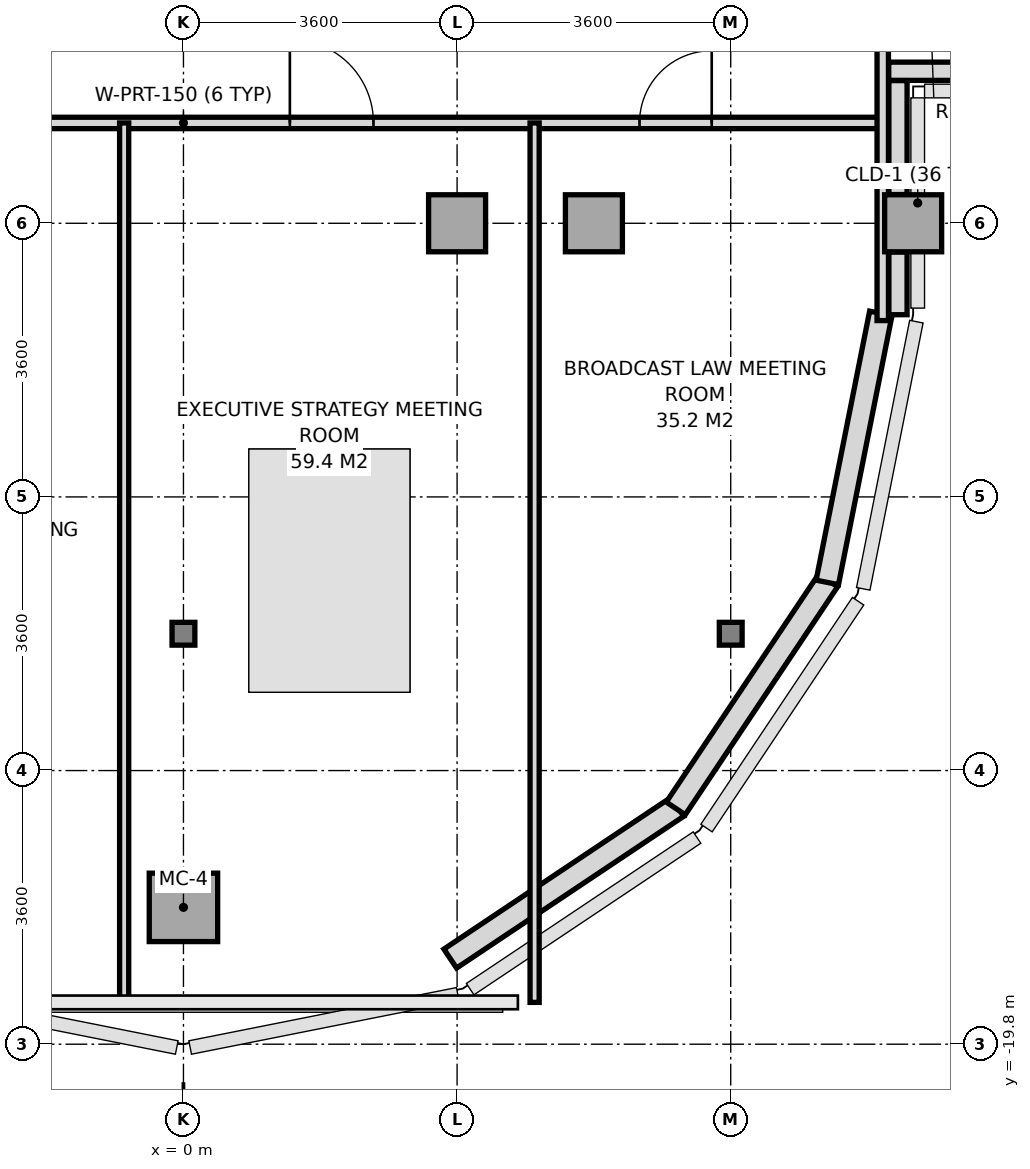
"""IFC4 building model, lengths in metres.
Left out: names, types, materials, properties, quantities, classifications, styles, units other than length and angle.
Written with IfcOpenShell. Run it as: python <this file> out.ifc"""

import sys

from ifc_helpers import new_model, si_unit, direction, frame, frame_2d, origin, origin_2d, place, context, subcontext, project, spatial, rectangle, i_section, extrude, source, transform, mapped, element, fill, save


model = new_model("IFC4")
c1 = context("Model", 3, precision=1e-05, world=origin(), true_north=direction((0.0, 1.0)))
c2 = subcontext(c1, "Body", "Model", "MODEL_VIEW")
j1 = project(units=[si_unit("LENGTHUNIT", "METRE"), si_unit("PLANEANGLEUNIT", "RADIAN")], contexts=[c1])
p1 = place(None, origin())
s1 = spatial("IfcSite", under=j1, at=p1, CompositionType="ELEMENT")
p2 = place(p1, origin())
s2 = spatial("IfcBuilding", under=s1, at=p2, CompositionType="ELEMENT")
p3 = place(p2, frame((0.0, 0.0, 262.0)))
s3 = spatial("IfcBuildingStorey", under=s2, at=p3, CompositionType="ELEMENT", Elevation=262.0)
m1 = source(origin(), c2, "Body", "SweptSolid", [
    extrude(rectangle(XDim=0.9, YDim=0.9, at=origin_2d()), origin(), (0.0, 0.0, 1.0), 3.01),
])
p4 = place(p3, frame((0.0, -18.0, 0.0), z_axis=(0.0, 0.0, 1.0), x_axis=(1.0, 0.0, 0.0)))
e1 = element("IfcColumn", 1, at=p4, inside=s3, PredefinedType="COLUMN", context=c2, shape_type="MappedRepresentation", body=[
    mapped(m1, transform((0.0, 0.0, 0.0), x_axis=(1.0, 0.0, 0.0), y_axis=(0.0, 1.0, 0.0), z_axis=(0.0, 0.0, 1.0), scale=1.0)),
])
m2 = source(origin(), c2, "Body", "SweptSolid", [
    extrude(i_section(OverallWidth=0.3, OverallDepth=0.3, WebThickness=0.011, FlangeThickness=0.019, at=origin_2d()), origin(), (0.0, 0.0, 1.0), 3.01),
])
p5 = place(p3, frame((0.0, -14.4, 0.0), z_axis=(0.0, 0.0, 1.0), x_axis=(1.0, 0.0, 0.0)))
e2 = element("IfcColumn", 2, at=p5, inside=s3, PredefinedType="COLUMN", context=c2, shape_type="MappedRepresentation", body=[
    mapped(m2, transform((0.0, 0.0, 0.0), x_axis=(1.0, 0.0, 0.0), y_axis=(0.0, 1.0, 0.0), z_axis=(0.0, 0.0, 1.0), scale=1.0)),
])
m3 = source(origin(), c2, "Body", "SweptSolid", [
    extrude(rectangle(XDim=0.75, YDim=0.75, at=origin_2d()), origin(), (0.0, 0.0, 1.0), 3.01),
])
for number, where, z_axis, x_axis in (
    (3, (3.6, -9.0, 0.0), (0.0, 0.0, 1.0), (1.0, 0.0, 0.0)),
    (4, (5.4, -9.0, 0.0), (0.0, 0.0, 1.0), (1.0, 0.0, 0.0)),
):
    element("IfcColumn", number, at=place(p3, frame(where, z_axis=z_axis, x_axis=x_axis)), inside=s3, PredefinedType="COLUMN", context=c2, shape_type="MappedRepresentation", body=[
        mapped(m3, transform((0.0, 0.0, 0.0), x_axis=(1.0, 0.0, 0.0), y_axis=(0.0, 1.0, 0.0), z_axis=(0.0, 0.0, 1.0), scale=1.0)),
    ])
p6 = place(p3, frame((7.2, -14.4, 0.0), z_axis=(0.0, 0.0, 1.0), x_axis=(1.0, 0.0, 0.0)))
e5 = element("IfcColumn", 5, at=p6, inside=s3, PredefinedType="COLUMN", context=c2, shape_type="MappedRepresentation", body=[
    mapped(m2, transform((0.0, 0.0, 0.0), x_axis=(1.0, 0.0, 0.0), y_axis=(0.0, 1.0, 0.0), z_axis=(0.0, 0.0, 1.0), scale=1.0)),
])
p7 = place(p3, frame((9.6, -9.0, 0.0), z_axis=(0.0, 0.0, 1.0), x_axis=(1.0, 0.0, 0.0)))
e6 = element("IfcColumn", 6, at=p7, inside=s3, PredefinedType="COLUMN", context=c2, shape_type="MappedRepresentation", body=[
    mapped(m3, transform((0.0, 0.0, 0.0), x_axis=(1.0, 0.0, 0.0), y_axis=(0.0, 1.0, 0.0), z_axis=(0.0, 0.0, 1.0), scale=1.0)),
])
p8 = place(p3, frame((3.51, -18.674, 0.0), z_axis=(0.0, 0.0, 1.0), x_axis=(0.831443568068, 0.555609208993, 0.0)))
e7 = element("IfcWall", 7, at=p8, inside=s3, PredefinedType="SOLIDWALL", context=c2, shape_type="SweptSolid", body=[
    extrude(rectangle(XDim=3.594, YDim=0.3, at=frame_2d((1.797, 0.0))), origin(), (0.0, 0.0, 1.0), 3.01),
])
p9 = place(p3, frame((6.477, -16.698, 0.0), z_axis=(0.0, 0.0, 1.0), x_axis=(0.555574187116, 0.831466970246, 0.0)))
e8 = element("IfcWall", 8, at=p9, inside=s3, PredefinedType="SOLIDWALL", context=c2, shape_type="SweptSolid", body=[
    extrude(rectangle(XDim=3.609, YDim=0.3, at=frame_2d((1.804, 0.0))), origin(), (0.0, 0.0, 1.0), 2.61),
])
p10 = place(p3, frame((8.471, -13.725, 0.0), z_axis=(0.0, 0.0, 1.0), x_axis=(0.195114232679, 0.980780523974, 0.0)))
e9 = element("IfcWall", 9, at=p10, inside=s3, PredefinedType="SOLIDWALL", context=c2, shape_type="SweptSolid", body=[
    extrude(rectangle(XDim=3.609, YDim=0.3, at=frame_2d((1.804, 0.0))), origin(), (0.0, 0.0, 1.0), 3.01),
])
p11 = place(p3, frame((12.877, -7.0, 0.0), z_axis=(0.0, 0.0, 1.0), x_axis=(-1.0, 0.0, 0.0)))
e10 = element("IfcWall", 10, at=p11, inside=s3, PredefinedType="PARAPET", context=c2, shape_type="SweptSolid", body=[
    extrude(rectangle(XDim=3.599, YDim=0.24, at=frame_2d((1.799, 0.0))), origin(), (0.0, 0.0, 1.0), 1.15),
])
p12 = place(p3, frame((9.4, -7.123, 0.0), z_axis=(0.0, 0.0, 1.0), x_axis=(0.0, -1.0, 0.0)))
e11 = element("IfcWall", 11, at=p12, inside=s3, PredefinedType="PARAPET", context=c2, shape_type="SweptSolid", body=[
    extrude(rectangle(XDim=1.499, YDim=0.24, at=frame_2d((0.75, 0.0))), origin(), (0.0, 0.0, 1.0), 1.15),
])
p13 = place(p3, frame((9.4, -9.378, 0.0), z_axis=(0.0, 0.0, 1.0), x_axis=(0.0, -1.0, 0.0)))
e12 = element("IfcWall", 12, at=p13, inside=s3, PredefinedType="PARAPET", context=c2, shape_type="SweptSolid", body=[
    extrude(rectangle(XDim=0.825, YDim=0.24, at=frame_2d((0.413, 0.0))), origin(), (0.0, 0.0, 1.0), 1.15),
])
p14 = place(p3, frame((-9.2, -7.68, 0.0), z_axis=(0.0, 0.0, 1.0), x_axis=(1.0, 0.0, 0.0)))
e13 = element("IfcWall", 13, at=p14, inside=s3, PredefinedType="PARTITIONING", context=c2, shape_type="SweptSolid", body=[
    extrude(rectangle(XDim=18.4, YDim=0.15, at=frame_2d((9.2, 0.0))), origin(), (0.0, 0.0, 1.0), 2.57),
])
p15 = place(p14, frame((1.6, 0.0, 0.0)))
e14 = element("IfcOpeningElement", 14, at=p15, cuts=e13, PredefinedType="OPENING", context=c2, shape_type="SweptSolid", body=[
    extrude(rectangle(XDim=0.95, YDim=2.15, at=frame_2d((0.475, 1.075))), frame((0.0, 0.085, 0.0), z_axis=(0.0, -1.0, 0.0), x_axis=(1.0, 0.0, 0.0)), (0.0, 0.0, 1.0), 0.17),
])
p16 = place(p14, frame((6.15, 0.0, 0.0)))
e15 = element("IfcOpeningElement", 15, at=p16, cuts=e13, PredefinedType="OPENING", context=c2, shape_type="SweptSolid", body=[
    extrude(rectangle(XDim=0.95, YDim=2.15, at=frame_2d((0.475, 1.075))), frame((0.0, 0.085, 0.0), z_axis=(0.0, -1.0, 0.0), x_axis=(1.0, 0.0, 0.0)), (0.0, 0.0, 1.0), 0.17),
])
p17 = place(p14, frame((10.6, 0.0, 0.0)))
e16 = element("IfcOpeningElement", 16, at=p17, cuts=e13, PredefinedType="OPENING", context=c2, shape_type="SweptSolid", body=[
    extrude(rectangle(XDim=1.1, YDim=2.2, at=frame_2d((0.55, 1.1))), frame((0.0, 0.085, 0.0), z_axis=(0.0, -1.0, 0.0), x_axis=(1.0, 0.0, 0.0)), (0.0, 0.0, 1.0), 0.17),
])
p18 = place(p14, frame((15.2, 0.0, 0.0)))
e17 = element("IfcOpeningElement", 17, at=p18, cuts=e13, PredefinedType="OPENING", context=c2, shape_type="SweptSolid", body=[
    extrude(rectangle(XDim=0.95, YDim=2.15, at=frame_2d((0.475, 1.075))), frame((0.0, 0.085, 0.0), z_axis=(0.0, -1.0, 0.0), x_axis=(1.0, 0.0, 0.0)), (0.0, 0.0, 1.0), 0.17),
])
p19 = place(p3, frame((9.2, -10.28, 0.0), z_axis=(0.0, 0.0, 1.0), x_axis=(0.0, 1.0, 0.0)))
e18 = element("IfcWall", 18, at=p19, inside=s3, PredefinedType="PARTITIONING", context=c2, shape_type="SweptSolid", body=[
    extrude(rectangle(XDim=4.34, YDim=0.15, at=frame_2d((2.17, 0.0))), origin(), (0.0, 0.0, 1.0), 2.61),
])
for number, where, z_axis, x_axis in (
    (19, (-0.78, -19.25, 0.0), (0.0, 0.0, 1.0), (0.0, 1.0, 0.0)),
    (20, (4.62, -19.25, 0.0), (0.0, 0.0, 1.0), (0.0, 1.0, 0.0)),
):
    element("IfcWall", number, at=place(p3, frame(where, z_axis=z_axis, x_axis=x_axis)), inside=s3, PredefinedType="PARTITIONING", context=c2, shape_type="SweptSolid", body=[
        extrude(rectangle(XDim=11.57, YDim=0.12, at=frame_2d((5.785, 0.0))), origin(), (0.0, 0.0, 1.0), 2.61),
    ])
m4 = source(origin(), c2, "Body", "SweptSolid", [
    extrude(rectangle(XDim=1.1, YDim=2.2, at=frame_2d((0.55, 1.1))), frame((0.0, 0.025, 0.0), z_axis=(0.0, -1.0, 0.0), x_axis=(1.0, 0.0, 0.0)), (0.0, 0.0, 1.0), 0.05),
])
p20 = place(p17, origin())
e21 = element("IfcDoor", 21, at=p20, inside=s3, OperationType="SINGLE_SWING_LEFT", PredefinedType="DOOR", context=c2, shape_type="MappedRepresentation", body=[
    mapped(m4, transform((0.0, 0.0, 0.0), x_axis=(1.0, 0.0, 0.0), y_axis=(0.0, 1.0, 0.0), z_axis=(0.0, 0.0, 1.0), scale=1.0)),
])
fill(e16, e21)
m5 = source(origin(), c2, "Body", "SweptSolid", [
    extrude(rectangle(XDim=0.95, YDim=2.15, at=frame_2d((0.475, 1.075))), frame((0.0, 0.025, 0.0), z_axis=(0.0, -1.0, 0.0), x_axis=(1.0, 0.0, 0.0)), (0.0, 0.0, 1.0), 0.05),
])
p21 = place(p18, origin())
e22 = element("IfcDoor", 22, at=p21, inside=s3, OperationType="SINGLE_SWING_RIGHT", PredefinedType="DOOR", context=c2, shape_type="MappedRepresentation", body=[
    mapped(m5, transform((0.0, 0.0, 0.0), x_axis=(1.0, 0.0, 0.0), y_axis=(0.0, 1.0, 0.0), z_axis=(0.0, 0.0, 1.0), scale=1.0)),
])
fill(e17, e22)
save(model, sys.argv[1])
